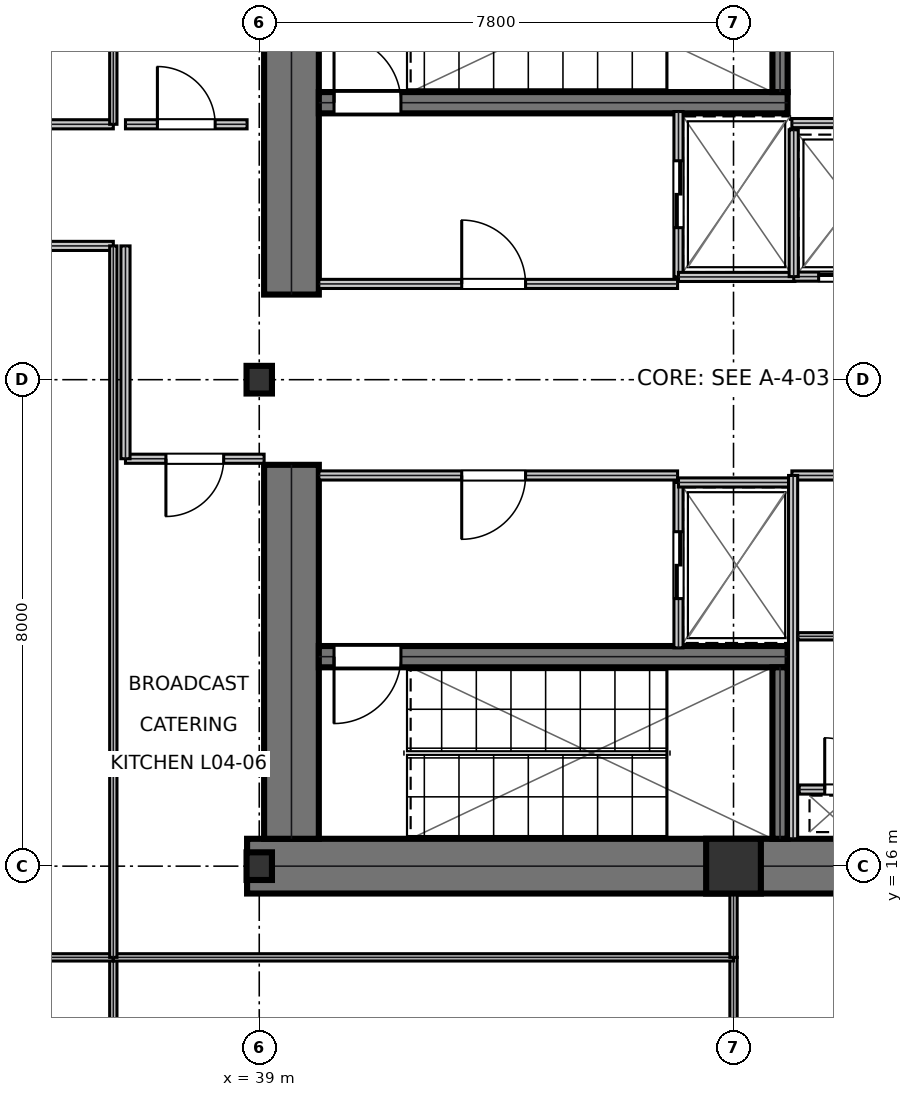
"""IFC4 building model, lengths in metres.
Left out: names, types, materials, properties, quantities, classifications, styles, units other than length and angle.
Written with IfcOpenShell. Run it as: python <this file> out.ifc"""

import sys

from ifc_helpers import new_model, si_unit, direction, frame, frame_2d, origin, origin_2d, place, context, subcontext, project, spatial, rectangle, i_section, extrude, element, fill, save


model = new_model("IFC4")
c1 = context("Model", 3, precision=1e-05, world=origin(), true_north=direction((0.0, 1.0)))
c2 = subcontext(c1, "Body", "Model", "MODEL_VIEW")
j1 = project(units=[si_unit("LENGTHUNIT", "METRE"), si_unit("PLANEANGLEUNIT", "RADIAN")], contexts=[c1])
p1 = place(None, origin())
s1 = spatial("IfcSite", under=j1, at=p1, CompositionType="ELEMENT")
p2 = place(p1, origin())
s2 = spatial("IfcBuilding", under=s1, at=p2, CompositionType="ELEMENT")
p3 = place(p2, frame((0.0, 0.0, 21.6)))
s3 = spatial("IfcBuildingStorey", under=s2, at=p3, CompositionType="ELEMENT", Elevation=21.6)
p4 = place(p3, frame((38.8, 16.0, 0.0), z_axis=(0.0, 0.0, 1.0), x_axis=(1.0, 0.0, 0.0)))
e1 = element("IfcWall", 1, at=p4, inside=s3, PredefinedType="SHEAR", context=c2, shape_type="SweptSolid", body=[
    extrude(rectangle(XDim=16.0, YDim=0.9, at=frame_2d((8.0, 0.0))), origin(), (0.0, 0.0, 1.0), 5.08),
])
for number, where, z_axis, x_axis in (
    (2, (39.53, 16.45, 0.0), (0.0, 0.0, 1.0), (0.0, 1.0, 0.0)),
    (3, (39.53, 25.4, 0.0), (0.0, 0.0, 1.0), (0.0, 1.0, 0.0)),
):
    element("IfcWall", number, at=place(p3, frame(where, z_axis=z_axis, x_axis=x_axis)), inside=s3, PredefinedType="SHEAR", context=c2, shape_type="SweptSolid", body=[
        extrude(rectangle(XDim=6.15, YDim=0.9, at=frame_2d((3.075, 0.0))), origin(), (0.0, 0.0, 1.0), 5.08),
    ])
p5 = place(p3, frame((39.98, 28.555, 0.0), z_axis=(0.0, 0.0, 1.0), x_axis=(1.0, 0.0, 0.0)))
e4 = element("IfcWall", 4, at=p5, inside=s3, PredefinedType="SHEAR", context=c2, shape_type="SweptSolid", body=[
    extrude(rectangle(XDim=7.71, YDim=0.35, at=frame_2d((3.855, 0.0))), origin(), (0.0, 0.0, 1.0), 5.08),
])
p6 = place(p5, frame((0.25, 0.0, 0.0)))
e5 = element("IfcOpeningElement", 5, at=p6, cuts=e4, PredefinedType="OPENING", context=c2, shape_type="SweptSolid", body=[
    extrude(rectangle(XDim=1.1, YDim=2.15, at=frame_2d((0.55, 1.075))), frame((0.0, 0.185, 0.0), z_axis=(0.0, -1.0, 0.0), x_axis=(1.0, 0.0, 0.0)), (0.0, 0.0, 1.0), 0.37),
])
p7 = place(p3, frame((39.98, 19.445, 0.0), z_axis=(0.0, 0.0, 1.0), x_axis=(1.0, 0.0, 0.0)))
e6 = element("IfcWall", 6, at=p7, inside=s3, PredefinedType="SHEAR", context=c2, shape_type="SweptSolid", body=[
    extrude(rectangle(XDim=7.71, YDim=0.35, at=frame_2d((3.855, 0.0))), origin(), (0.0, 0.0, 1.0), 5.08),
])
p8 = place(p7, frame((0.25, 0.0, 0.0)))
e7 = element("IfcOpeningElement", 7, at=p8, cuts=e6, PredefinedType="OPENING", context=c2, shape_type="SweptSolid", body=[
    extrude(rectangle(XDim=1.1, YDim=2.15, at=frame_2d((0.55, 1.075))), frame((0.0, 0.185, 0.0), z_axis=(0.0, -1.0, 0.0), x_axis=(1.0, 0.0, 0.0)), (0.0, 0.0, 1.0), 0.37),
])
for number, where, z_axis, x_axis in (
    (8, (47.565, 28.73, 0.0), (0.0, 0.0, 1.0), (0.0, 1.0, 0.0)),
    (9, (47.565, 16.45, 0.0), (0.0, 0.0, 1.0), (0.0, 1.0, 0.0)),
):
    element("IfcWall", number, at=place(p3, frame(where, z_axis=z_axis, x_axis=x_axis)), inside=s3, PredefinedType="SHEAR", context=c2, shape_type="SweptSolid", body=[
        extrude(rectangle(XDim=2.82, YDim=0.25, at=frame_2d((1.41, 0.0))), origin(), (0.0, 0.0, 1.0), 5.08),
    ])
for number, where, z_axis, x_axis in (
    (10, (39.0, 16.0, 0.0), (0.0, 0.0, 1.0), (1.0, 0.0, 0.0)),
    (11, (39.0, 24.0, 0.0), (0.0, 0.0, 1.0), (1.0, 0.0, 0.0)),
):
    element("IfcColumn", number, at=place(p3, frame(where, z_axis=z_axis, x_axis=x_axis)), inside=s3, PredefinedType="COLUMN", context=c2, shape_type="SweptSolid", body=[
        extrude(i_section(OverallWidth=0.418, OverallDepth=0.455, WebThickness=0.042, FlangeThickness=0.068, at=origin_2d()), origin(), (0.0, 0.0, 1.0), 5.395),
    ])
p9 = place(p3, frame((46.8, 16.0, 0.0), z_axis=(0.0, 0.0, 1.0), x_axis=(1.0, 0.0, 0.0)))
e12 = element("IfcColumn", 12, at=p9, inside=s3, PredefinedType="COLUMN", context=c2, shape_type="SweptSolid", body=[
    extrude(rectangle(XDim=0.9, YDim=0.9, at=origin_2d()), origin(), (0.0, 0.0, 1.0), 5.395),
])
p10 = place(p3, frame((39.98, 25.575, 0.0), z_axis=(0.0, 0.0, 1.0), x_axis=(1.0, 0.0, 0.0)))
e13 = element("IfcWall", 13, at=p10, inside=s3, PredefinedType="PARTITIONING", context=c2, shape_type="SweptSolid", body=[
    extrude(rectangle(XDim=5.9, YDim=0.15, at=frame_2d((2.95, 0.0))), origin(), (0.0, 0.0, 1.0), 5.08),
])
p11 = place(p10, frame((2.35, 0.0, 0.0)))
e14 = element("IfcOpeningElement", 14, at=p11, cuts=e13, PredefinedType="OPENING", context=c2, shape_type="SweptSolid", body=[
    extrude(rectangle(XDim=1.05, YDim=2.15, at=frame_2d((0.525, 1.075))), frame((0.0, 0.085, 0.0), z_axis=(0.0, -1.0, 0.0), x_axis=(1.0, 0.0, 0.0)), (0.0, 0.0, 1.0), 0.17),
])
p12 = place(p3, frame((39.98, 22.425, 0.0), z_axis=(0.0, 0.0, 1.0), x_axis=(1.0, 0.0, 0.0)))
e15 = element("IfcWall", 15, at=p12, inside=s3, PredefinedType="PARTITIONING", context=c2, shape_type="SweptSolid", body=[
    extrude(rectangle(XDim=5.9, YDim=0.15, at=frame_2d((2.95, 0.0))), origin(), (0.0, 0.0, 1.0), 5.08),
])
p13 = place(p12, frame((2.35, 0.0, 0.0)))
e16 = element("IfcOpeningElement", 16, at=p13, cuts=e15, PredefinedType="OPENING", context=c2, shape_type="SweptSolid", body=[
    extrude(rectangle(XDim=1.05, YDim=2.15, at=frame_2d((0.525, 1.075))), frame((0.0, 0.085, 0.0), z_axis=(0.0, -1.0, 0.0), x_axis=(1.0, 0.0, 0.0)), (0.0, 0.0, 1.0), 0.17),
])
p14 = place(p3, frame((45.895, 25.69, 0.0), z_axis=(0.0, 0.0, 1.0), x_axis=(0.0, 1.0, 0.0)))
e17 = element("IfcWall", 17, at=p14, inside=s3, PredefinedType="PARTITIONING", context=c2, shape_type="SweptSolid", body=[
    extrude(rectangle(XDim=2.72, YDim=0.15, at=frame_2d((1.36, 0.0))), origin(), (0.0, 0.0, 1.0), 5.08),
])
p15 = place(p14, frame((0.81, 0.0, 0.0)))
e18 = element("IfcOpeningElement", 18, at=p15, cuts=e17, PredefinedType="OPENING", context=c2, shape_type="SweptSolid", body=[
    extrude(rectangle(XDim=1.1, YDim=2.15, at=frame_2d((0.55, 1.075))), frame((0.0, 0.085, 0.0), z_axis=(0.0, -1.0, 0.0), x_axis=(1.0, 0.0, 0.0)), (0.0, 0.0, 1.0), 0.17),
])
p16 = place(p3, frame((45.895, 25.69, 0.0), z_axis=(0.0, 0.0, 1.0), x_axis=(1.0, 0.0, 0.0)))
e19 = element("IfcWall", 19, at=p16, inside=s3, PredefinedType="PARTITIONING", context=c2, shape_type="SweptSolid", body=[
    extrude(rectangle(XDim=1.915, YDim=0.15, at=frame_2d((0.958, 0.0))), origin(), (0.0, 0.0, 1.0), 5.08),
])
p17 = place(p3, frame((45.895, 19.59, 0.0), z_axis=(0.0, 0.0, 1.0), x_axis=(0.0, 1.0, 0.0)))
e20 = element("IfcWall", 20, at=p17, inside=s3, PredefinedType="PARTITIONING", context=c2, shape_type="SweptSolid", body=[
    extrude(rectangle(XDim=2.72, YDim=0.15, at=frame_2d((1.36, 0.0))), origin(), (0.0, 0.0, 1.0), 5.08),
])
p18 = place(p17, frame((0.81, 0.0, 0.0)))
e21 = element("IfcOpeningElement", 21, at=p18, cuts=e20, PredefinedType="OPENING", context=c2, shape_type="SweptSolid", body=[
    extrude(rectangle(XDim=1.1, YDim=2.15, at=frame_2d((0.55, 1.075))), frame((0.0, 0.085, 0.0), z_axis=(0.0, -1.0, 0.0), x_axis=(1.0, 0.0, 0.0)), (0.0, 0.0, 1.0), 0.17),
])
p19 = place(p3, frame((45.895, 22.31, 0.0), z_axis=(0.0, 0.0, 1.0), x_axis=(1.0, 0.0, 0.0)))
e22 = element("IfcWall", 22, at=p19, inside=s3, PredefinedType="PARTITIONING", context=c2, shape_type="SweptSolid", body=[
    extrude(rectangle(XDim=1.915, YDim=0.15, at=frame_2d((0.958, 0.0))), origin(), (0.0, 0.0, 1.0), 5.08),
])
p20 = place(p3, frame((47.79, 25.695, 0.0), z_axis=(0.0, 0.0, 1.0), x_axis=(1.0, 0.0, 0.0)))
e23 = element("IfcWall", 23, at=p20, inside=s3, PredefinedType="PARTITIONING", context=c2, shape_type="SweptSolid", body=[
    extrude(rectangle(XDim=1.92, YDim=0.15, at=frame_2d((0.96, 0.0))), origin(), (0.0, 0.0, 1.0), 5.08),
])
p21 = place(p20, frame((0.41, 0.0, 0.0)))
e24 = element("IfcOpeningElement", 24, at=p21, cuts=e23, PredefinedType="OPENING", context=c2, shape_type="SweptSolid", body=[
    extrude(rectangle(XDim=1.1, YDim=2.15, at=frame_2d((0.55, 1.075))), frame((0.0, 0.085, 0.0), z_axis=(0.0, -1.0, 0.0), x_axis=(1.0, 0.0, 0.0)), (0.0, 0.0, 1.0), 0.17),
])
p22 = place(p3, frame((47.79, 25.695, 0.0), z_axis=(0.0, 0.0, 1.0), x_axis=(0.0, 1.0, 0.0)))
e25 = element("IfcWall", 25, at=p22, inside=s3, PredefinedType="PARTITIONING", context=c2, shape_type="SweptSolid", body=[
    extrude(rectangle(XDim=2.415, YDim=0.15, at=frame_2d((1.208, 0.0))), origin(), (0.0, 0.0, 1.0), 5.08),
])
p23 = place(p3, frame((47.88, 17.26, 0.0), z_axis=(0.0, 0.0, 1.0), x_axis=(1.0, 0.0, 0.0)))
e26 = element("IfcWall", 26, at=p23, inside=s3, PredefinedType="PARTITIONING", context=c2, shape_type="SweptSolid", body=[
    extrude(rectangle(XDim=1.72, YDim=0.15, at=frame_2d((0.86, 0.0))), origin(), (0.0, 0.0, 1.0), 5.08),
])
p24 = place(p23, frame((0.42, 0.0, 0.0)))
e27 = element("IfcOpeningElement", 27, at=p24, cuts=e26, PredefinedType="OPENING", context=c2, shape_type="SweptSolid", body=[
    extrude(rectangle(XDim=0.85, YDim=2.15, at=frame_2d((0.425, 1.075))), frame((0.0, 0.085, 0.0), z_axis=(0.0, -1.0, 0.0), x_axis=(1.0, 0.0, 0.0)), (0.0, 0.0, 1.0), 0.17),
])
p25 = place(p3, frame((47.76, 22.425, 0.0), z_axis=(0.0, 0.0, 1.0), x_axis=(1.0, 0.0, 0.0)))
e28 = element("IfcWall", 28, at=p25, inside=s3, PredefinedType="PARTITIONING", context=c2, shape_type="SweptSolid", body=[
    extrude(rectangle(XDim=1.96, YDim=0.15, at=frame_2d((0.98, 0.0))), origin(), (0.0, 0.0, 1.0), 5.08),
])
p26 = place(p3, frame((47.78, 16.45, 0.0), z_axis=(0.0, 0.0, 1.0), x_axis=(0.0, 1.0, 0.0)))
e29 = element("IfcWall", 29, at=p26, inside=s3, PredefinedType="PARTITIONING", context=c2, shape_type="SweptSolid", body=[
    extrude(rectangle(XDim=5.975, YDim=0.15, at=frame_2d((2.988, 0.0))), origin(), (0.0, 0.0, 1.0), 5.08),
])
p27 = place(p3, frame((47.86, 19.78, 0.0), z_axis=(0.0, 0.0, 1.0), x_axis=(1.0, 0.0, 0.0)))
e30 = element("IfcWall", 30, at=p27, inside=s3, PredefinedType="PARTITIONING", context=c2, shape_type="SweptSolid", body=[
    extrude(rectangle(XDim=1.76, YDim=0.12, at=frame_2d((0.88, 0.0))), origin(), (0.0, 0.0, 1.0), 5.08),
])
p28 = place(p3, frame((47.76, 28.22, 0.0), z_axis=(0.0, 0.0, 1.0), x_axis=(1.0, 0.0, 0.0)))
e31 = element("IfcWall", 31, at=p28, inside=s3, PredefinedType="PARTITIONING", context=c2, shape_type="SweptSolid", body=[
    extrude(rectangle(XDim=1.96, YDim=0.15, at=frame_2d((0.98, 0.0))), origin(), (0.0, 0.0, 1.0), 5.08),
])
p29 = place(p3, frame((36.8, 22.7, 0.0), z_axis=(0.0, 0.0, 1.0), x_axis=(1.0, 0.0, 0.0)))
e32 = element("IfcWall", 32, at=p29, inside=s3, PredefinedType="PARTITIONING", context=c2, shape_type="SweptSolid", body=[
    extrude(rectangle(XDim=2.28, YDim=0.15, at=frame_2d((1.14, 0.0))), origin(), (0.0, 0.0, 1.0), 4.375),
])
p30 = place(p29, frame((0.665, 0.0, 0.0)))
e33 = element("IfcOpeningElement", 33, at=p30, cuts=e32, PredefinedType="OPENING", context=c2, shape_type="SweptSolid", body=[
    extrude(rectangle(XDim=0.95, YDim=2.15, at=frame_2d((0.475, 1.075))), frame((0.0, 0.085, 0.0), z_axis=(0.0, -1.0, 0.0), x_axis=(1.0, 0.0, 0.0)), (0.0, 0.0, 1.0), 0.17),
])
p31 = place(p3, frame((28.2, 28.2, 0.0), z_axis=(0.0, 0.0, 1.0), x_axis=(1.0, 0.0, 0.0)))
e34 = element("IfcWall", 34, at=p31, inside=s3, PredefinedType="PARTITIONING", context=c2, shape_type="SweptSolid", body=[
    extrude(rectangle(XDim=8.4, YDim=0.15, at=frame_2d((4.2, 0.0))), origin(), (0.0, 0.0, 1.0), 4.375),
])
p32 = place(p31, frame((3.725, 0.0, 0.0)))
e35 = element("IfcOpeningElement", 35, at=p32, cuts=e34, PredefinedType="OPENING", context=c2, shape_type="SweptSolid", body=[
    extrude(rectangle(XDim=0.95, YDim=2.15, at=frame_2d((0.475, 1.075))), frame((0.0, 0.085, 0.0), z_axis=(0.0, -1.0, 0.0), x_axis=(1.0, 0.0, 0.0)), (0.0, 0.0, 1.0), 0.17),
])
p33 = place(p3, frame((36.8, 28.2, 0.0), z_axis=(0.0, 0.0, 1.0), x_axis=(1.0, 0.0, 0.0)))
e36 = element("IfcWall", 36, at=p33, inside=s3, PredefinedType="PARTITIONING", context=c2, shape_type="SweptSolid", body=[
    extrude(rectangle(XDim=2.0, YDim=0.15, at=frame_2d((1.0, 0.0))), origin(), (0.0, 0.0, 1.0), 5.08),
])
p34 = place(p33, frame((0.525, 0.0, 0.0)))
e37 = element("IfcOpeningElement", 37, at=p34, cuts=e36, PredefinedType="OPENING", context=c2, shape_type="SweptSolid", body=[
    extrude(rectangle(XDim=0.95, YDim=2.15, at=frame_2d((0.475, 1.075))), frame((0.0, 0.085, 0.0), z_axis=(0.0, -1.0, 0.0), x_axis=(1.0, 0.0, 0.0)), (0.0, 0.0, 1.0), 0.17),
])
p35 = place(p3, frame((36.8, 22.7, 0.0), z_axis=(0.0, 0.0, 1.0), x_axis=(0.0, 1.0, 0.0)))
e38 = element("IfcWall", 38, at=p35, inside=s3, PredefinedType="PARTITIONING", context=c2, shape_type="SweptSolid", body=[
    extrude(rectangle(XDim=3.5, YDim=0.15, at=frame_2d((1.75, 0.0))), origin(), (0.0, 0.0, 1.0), 4.298),
])
p36 = place(p3, frame((28.2, 26.2, 0.0), z_axis=(0.0, 0.0, 1.0), x_axis=(1.0, 0.0, 0.0)))
e39 = element("IfcWall", 39, at=p36, inside=s3, PredefinedType="PARTITIONING", context=c2, shape_type="SweptSolid", body=[
    extrude(rectangle(XDim=8.4, YDim=0.15, at=frame_2d((4.2, 0.0))), origin(), (0.0, 0.0, 1.0), 4.375),
])
p37 = place(p3, frame((36.6, 4.5, 0.0), z_axis=(0.0, 0.0, 1.0), x_axis=(0.0, 1.0, 0.0)))
e40 = element("IfcWall", 40, at=p37, inside=s3, PredefinedType="PARTITIONING", context=c2, shape_type="SweptSolid", body=[
    extrude(rectangle(XDim=10.0, YDim=0.12, at=frame_2d((5.0, 0.0))), origin(), (0.0, 0.0, 1.0), 4.298),
])
p38 = place(p3, frame((28.2, 14.5, 0.0), z_axis=(0.0, 0.0, 1.0), x_axis=(1.0, 0.0, 0.0)))
e41 = element("IfcWall", 41, at=p38, inside=s3, PredefinedType="PARTITIONING", context=c2, shape_type="SweptSolid", body=[
    extrude(rectangle(XDim=8.4, YDim=0.12, at=frame_2d((4.2, 0.0))), origin(), (0.0, 0.0, 1.0), 3.648),
])
p39 = place(p3, frame((46.8, 4.5, 0.0), z_axis=(0.0, 0.0, 1.0), x_axis=(0.0, 1.0, 0.0)))
e42 = element("IfcWall", 42, at=p39, inside=s3, PredefinedType="PARTITIONING", context=c2, shape_type="SweptSolid", body=[
    extrude(rectangle(XDim=10.0, YDim=0.12, at=frame_2d((5.0, 0.0))), origin(), (0.0, 0.0, 1.0), 4.298),
])
p40 = place(p3, frame((36.6, 14.5, 0.0), z_axis=(0.0, 0.0, 1.0), x_axis=(1.0, 0.0, 0.0)))
e43 = element("IfcWall", 43, at=p40, inside=s3, PredefinedType="PARTITIONING", context=c2, shape_type="SweptSolid", body=[
    extrude(rectangle(XDim=10.2, YDim=0.12, at=frame_2d((5.1, 0.0))), origin(), (0.0, 0.0, 1.0), 4.375),
])
p41 = place(p3, frame((46.8, 14.5, 0.0), z_axis=(0.0, 0.0, 1.0), x_axis=(0.0, 1.0, 0.0)))
e44 = element("IfcWall", 44, at=p41, inside=s3, PredefinedType="PARTITIONING", context=c2, shape_type="SweptSolid", body=[
    extrude(rectangle(XDim=1.1, YDim=0.12, at=frame_2d((0.55, 0.0))), origin(), (0.0, 0.0, 1.0), 4.375),
])
p42 = place(p3, frame((36.6, 14.5, 0.0), z_axis=(0.0, 0.0, 1.0), x_axis=(0.0, 1.0, 0.0)))
e45 = element("IfcWall", 45, at=p42, inside=s3, PredefinedType="PARTITIONING", context=c2, shape_type="SweptSolid", body=[
    extrude(rectangle(XDim=11.7, YDim=0.12, at=frame_2d((5.85, 0.0))), origin(), (0.0, 0.0, 1.0), 3.648),
])
p43 = place(p3, frame((36.6, 28.2, 0.0), z_axis=(0.0, 0.0, 1.0), x_axis=(0.0, 1.0, 0.0)))
e46 = element("IfcWall", 46, at=p43, inside=s3, PredefinedType="PARTITIONING", context=c2, shape_type="SweptSolid", body=[
    extrude(rectangle(XDim=7.9, YDim=0.12, at=frame_2d((3.95, 0.0))), origin(), (0.0, 0.0, 1.0), 4.298),
])
p44 = place(p11, origin())
e47 = element("IfcDoor", 47, at=p44, inside=s3, OperationType="SINGLE_SWING_LEFT", PredefinedType="DOOR", context=c2, shape_type="SweptSolid", body=[
    extrude(rectangle(XDim=1.05, YDim=2.15, at=frame_2d((0.525, 1.075))), frame((0.0, 0.025, 0.0), z_axis=(0.0, -1.0, 0.0), x_axis=(1.0, 0.0, 0.0)), (0.0, 0.0, 1.0), 0.05),
])
fill(e14, e47)
p45 = place(p13, frame((1.05, 0.0, 0.0), z_axis=(0.0, 0.0, 1.0), x_axis=(-1.0, 0.0, 0.0)))
e48 = element("IfcDoor", 48, at=p45, inside=s3, OperationType="SINGLE_SWING_RIGHT", PredefinedType="DOOR", context=c2, shape_type="SweptSolid", body=[
    extrude(rectangle(XDim=1.05, YDim=2.15, at=frame_2d((0.525, 1.075))), frame((0.0, 0.025, 0.0), z_axis=(0.0, -1.0, 0.0), x_axis=(1.0, 0.0, 0.0)), (0.0, 0.0, 1.0), 0.05),
])
fill(e16, e48)
p46 = place(p15, frame((1.1, 0.0, 0.0), z_axis=(0.0, 0.0, 1.0), x_axis=(-1.0, 0.0, 0.0)))
e49 = element("IfcDoor", 49, at=p46, inside=s3, OperationType="DOUBLE_DOOR_SLIDING", PredefinedType="DOOR", context=c2, shape_type="SweptSolid", body=[
    extrude(rectangle(XDim=1.1, YDim=2.15, at=frame_2d((0.55, 1.075))), frame((0.0, 0.025, 0.0), z_axis=(0.0, -1.0, 0.0), x_axis=(1.0, 0.0, 0.0)), (0.0, 0.0, 1.0), 0.05),
])
fill(e18, e49)
p47 = place(p18, frame((1.1, 0.0, 0.0), z_axis=(0.0, 0.0, 1.0), x_axis=(-1.0, 0.0, 0.0)))
e50 = element("IfcDoor", 50, at=p47, inside=s3, OperationType="DOUBLE_DOOR_SLIDING", PredefinedType="DOOR", context=c2, shape_type="SweptSolid", body=[
    extrude(rectangle(XDim=1.1, YDim=2.15, at=frame_2d((0.55, 1.075))), frame((0.0, 0.025, 0.0), z_axis=(0.0, -1.0, 0.0), x_axis=(1.0, 0.0, 0.0)), (0.0, 0.0, 1.0), 0.05),
])
fill(e21, e50)
p48 = place(p21, frame((1.1, 0.0, 0.0), z_axis=(0.0, 0.0, 1.0), x_axis=(-1.0, 0.0, 0.0)))
e51 = element("IfcDoor", 51, at=p48, inside=s3, OperationType="DOUBLE_DOOR_SLIDING", PredefinedType="DOOR", context=c2, shape_type="SweptSolid", body=[
    extrude(rectangle(XDim=1.1, YDim=2.15, at=frame_2d((0.55, 1.075))), frame((0.0, 0.025, 0.0), z_axis=(0.0, -1.0, 0.0), x_axis=(1.0, 0.0, 0.0)), (0.0, 0.0, 1.0), 0.05),
])
fill(e24, e51)
p49 = place(p24, origin())
e52 = element("IfcDoor", 52, at=p49, inside=s3, OperationType="SINGLE_SWING_LEFT", PredefinedType="TRAPDOOR", context=c2, shape_type="SweptSolid", body=[
    extrude(rectangle(XDim=0.85, YDim=2.15, at=frame_2d((0.425, 1.075))), frame((0.0, 0.025, 0.0), z_axis=(0.0, -1.0, 0.0), x_axis=(1.0, 0.0, 0.0)), (0.0, 0.0, 1.0), 0.05),
])
fill(e27, e52)
p50 = place(p30, frame((0.95, 0.0, 0.0), z_axis=(0.0, 0.0, 1.0), x_axis=(-1.0, 0.0, 0.0)))
e53 = element("IfcDoor", 53, at=p50, inside=s3, OperationType="SINGLE_SWING_RIGHT", PredefinedType="DOOR", context=c2, shape_type="SweptSolid", body=[
    extrude(rectangle(XDim=0.95, YDim=2.15, at=frame_2d((0.475, 1.075))), frame((0.0, 0.025, 0.0), z_axis=(0.0, -1.0, 0.0), x_axis=(1.0, 0.0, 0.0)), (0.0, 0.0, 1.0), 0.05),
])
fill(e33, e53)
p51 = place(p34, origin())
e54 = element("IfcDoor", 54, at=p51, inside=s3, OperationType="SINGLE_SWING_LEFT", PredefinedType="DOOR", context=c2, shape_type="SweptSolid", body=[
    extrude(rectangle(XDim=0.95, YDim=2.15, at=frame_2d((0.475, 1.075))), frame((0.0, 0.025, 0.0), z_axis=(0.0, -1.0, 0.0), x_axis=(1.0, 0.0, 0.0)), (0.0, 0.0, 1.0), 0.05),
])
fill(e37, e54)
p52 = place(p6, origin())
e55 = element("IfcDoor", 55, at=p52, inside=s3, OperationType="SINGLE_SWING_LEFT", PredefinedType="DOOR", context=c2, shape_type="SweptSolid", body=[
    extrude(rectangle(XDim=1.1, YDim=2.15, at=frame_2d((0.55, 1.075))), frame((0.0, 0.025, 0.0), z_axis=(0.0, -1.0, 0.0), x_axis=(1.0, 0.0, 0.0)), (0.0, 0.0, 1.0), 0.05),
])
fill(e5, e55)
p53 = place(p8, frame((1.1, 0.0, 0.0), z_axis=(0.0, 0.0, 1.0), x_axis=(-1.0, 0.0, 0.0)))
e56 = element("IfcDoor", 56, at=p53, inside=s3, OperationType="SINGLE_SWING_RIGHT", PredefinedType="DOOR", context=c2, shape_type="SweptSolid", body=[
    extrude(rectangle(XDim=1.1, YDim=2.15, at=frame_2d((0.55, 1.075))), frame((0.0, 0.025, 0.0), z_axis=(0.0, -1.0, 0.0), x_axis=(1.0, 0.0, 0.0)), (0.0, 0.0, 1.0), 0.05),
])
fill(e7, e56)
save(model, sys.argv[1])
